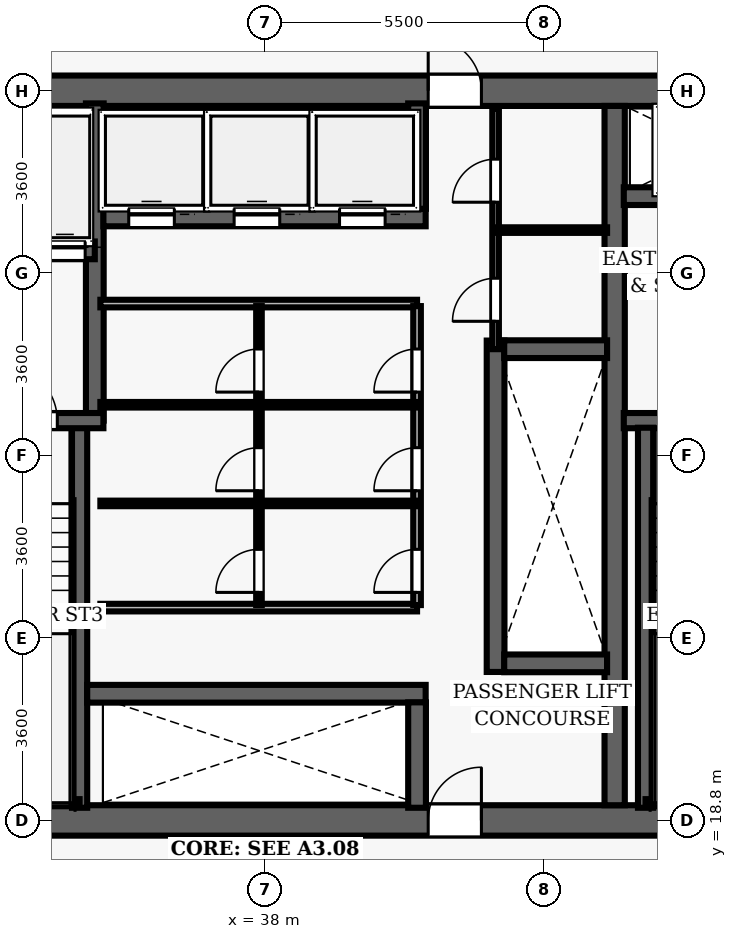
"""IFC4 building model, lengths in metres.
Left out: names, types, materials, properties, quantities, classifications, styles, units other than length and angle.
Written with IfcOpenShell. Run it as: python <this file> out.ifc"""

import sys

from ifc_helpers import new_model, si_unit, direction, frame, frame_2d, origin, place, context, subcontext, project, spatial, rectangle, extrude, element, fill, save


model = new_model("IFC4")
c1 = context("Model", 3, precision=1e-05, world=origin(), true_north=direction((0.0, 1.0)))
c2 = subcontext(c1, "Body", "Model", "MODEL_VIEW")
j1 = project(units=[si_unit("LENGTHUNIT", "METRE"), si_unit("PLANEANGLEUNIT", "RADIAN")], contexts=[c1])
p1 = place(None, origin())
s1 = spatial("IfcSite", under=j1, at=p1, CompositionType="ELEMENT")
p2 = place(p1, origin())
s2 = spatial("IfcBuilding", under=s1, at=p2, CompositionType="ELEMENT")
p3 = place(p2, frame((0.0, 0.0, 69.4)))
s3 = spatial("IfcBuildingStorey", under=s2, at=p3, CompositionType="ELEMENT", Elevation=69.4)
p4 = place(p3, frame((26.7, 18.8, 0.0), z_axis=(0.0, 0.0, 1.0), x_axis=(1.0, 0.0, 0.0)))
e1 = element("IfcWall", 1, at=p4, inside=s3, PredefinedType="SHEAR", context=c2, shape_type="SweptSolid", body=[
    extrude(rectangle(XDim=22.6, YDim=0.6, at=frame_2d((11.3, 0.0))), origin(), (0.0, 0.0, 1.0), 3.5),
])
p5 = place(p4, frame((14.52, 0.0, 0.0)))
e2 = element("IfcOpeningElement", 2, at=p5, cuts=e1, PredefinedType="OPENING", context=c2, shape_type="SweptSolid", body=[
    extrude(rectangle(XDim=1.05, YDim=2.15, at=frame_2d((0.525, 1.075))), frame((0.0, 0.31, 0.0), z_axis=(0.0, -1.0, 0.0), x_axis=(1.0, 0.0, 0.0)), (0.0, 0.0, 1.0), 0.62),
])
p6 = place(p3, frame((26.7, 33.2, 0.0), z_axis=(0.0, 0.0, 1.0), x_axis=(1.0, 0.0, 0.0)))
e3 = element("IfcWall", 3, at=p6, inside=s3, PredefinedType="SHEAR", context=c2, shape_type="SweptSolid", body=[
    extrude(rectangle(XDim=22.6, YDim=0.6, at=frame_2d((11.3, 0.0))), origin(), (0.0, 0.0, 1.0), 3.5),
])
p7 = place(p6, frame((4.62, 0.0, 0.0)))
e4 = element("IfcOpeningElement", 4, at=p7, cuts=e3, PredefinedType="OPENING", context=c2, shape_type="SweptSolid", body=[
    extrude(rectangle(XDim=1.05, YDim=2.15, at=frame_2d((0.525, 1.075))), frame((0.0, 0.31, 0.0), z_axis=(0.0, -1.0, 0.0), x_axis=(1.0, 0.0, 0.0)), (0.0, 0.0, 1.0), 0.62),
])
p8 = place(p6, frame((14.52, 0.0, 0.0)))
e5 = element("IfcOpeningElement", 5, at=p8, cuts=e3, PredefinedType="OPENING", context=c2, shape_type="SweptSolid", body=[
    extrude(rectangle(XDim=1.05, YDim=2.15, at=frame_2d((0.525, 1.075))), frame((0.0, 0.31, 0.0), z_axis=(0.0, -1.0, 0.0), x_axis=(1.0, 0.0, 0.0)), (0.0, 0.0, 1.0), 0.62),
])
p9 = place(p3, frame((44.9, 19.1, 0.0), z_axis=(0.0, 0.0, 1.0), x_axis=(0.0, 1.0, 0.0)))
e6 = element("IfcWall", 6, at=p9, inside=s3, PredefinedType="SHEAR", context=c2, shape_type="SweptSolid", body=[
    extrude(rectangle(XDim=13.8, YDim=0.4, at=frame_2d((6.9, 0.0))), origin(), (0.0, 0.0, 1.0), 3.5),
])
p10 = place(p3, frame((45.08, 26.69, 0.0), z_axis=(0.0, 0.0, 1.0), x_axis=(1.0, 0.0, 0.0)))
e7 = element("IfcWall", 7, at=p10, inside=s3, PredefinedType="SHEAR", context=c2, shape_type="SweptSolid", body=[
    extrude(rectangle(XDim=3.67, YDim=0.3, at=frame_2d((1.835, 0.0))), origin(), (0.0, 0.0, 1.0), 3.5),
])
p11 = place(p10, frame((1.05, 0.0, 0.0)))
e8 = element("IfcOpeningElement", 8, at=p11, cuts=e7, PredefinedType="OPENING", context=c2, shape_type="SweptSolid", body=[
    extrude(rectangle(XDim=1.1, YDim=2.15, at=frame_2d((0.55, 1.075))), frame((0.0, 0.16, 0.0), z_axis=(0.0, -1.0, 0.0), x_axis=(1.0, 0.0, 0.0)), (0.0, 0.0, 1.0), 0.32),
])
p12 = place(p3, frame((45.51, 19.05, 0.0), z_axis=(0.0, 0.0, 1.0), x_axis=(0.0, 1.0, 0.0)))
e9 = element("IfcWall", 9, at=p12, inside=s3, PredefinedType="SHEAR", context=c2, shape_type="SweptSolid", body=[
    extrude(rectangle(XDim=7.5, YDim=0.3, at=frame_2d((3.75, 0.0))), origin(), (0.0, 0.0, 1.0), 3.5),
])
p13 = place(p3, frame((45.51, 19.16, 0.0), z_axis=(0.0, 0.0, 1.0), x_axis=(1.0, 0.0, 0.0)))
e10 = element("IfcWall", 10, at=p13, inside=s3, PredefinedType="SHEAR", context=c2, shape_type="SweptSolid", body=[
    extrude(rectangle(XDim=3.095, YDim=0.12, at=frame_2d((1.547, 0.0))), origin(), (0.0, 0.0, 1.0), 3.5),
])
p14 = place(p3, frame((45.08, 31.12, 0.0), z_axis=(0.0, 0.0, 1.0), x_axis=(1.0, 0.0, 0.0)))
e11 = element("IfcWall", 11, at=p14, inside=s3, PredefinedType="SHEAR", context=c2, shape_type="SweptSolid", body=[
    extrude(rectangle(XDim=3.67, YDim=0.35, at=frame_2d((1.835, 0.0))), origin(), (0.0, 0.0, 1.0), 2.6),
])
p15 = place(p14, frame((1.25, 0.0, 0.0)))
e12 = element("IfcOpeningElement", 12, at=p15, cuts=e11, PredefinedType="OPENING", context=c2, shape_type="SweptSolid", body=[
    extrude(rectangle(XDim=1.1, YDim=2.15, at=frame_2d((0.55, 1.075))), frame((0.0, 0.185, 0.0), z_axis=(0.0, -1.0, 0.0), x_axis=(1.0, 0.0, 0.0)), (0.0, 0.0, 1.0), 0.37),
])
p16 = place(p3, frame((34.34, 19.05, 0.0), z_axis=(0.0, 0.0, 1.0), x_axis=(0.0, 1.0, 0.0)))
e13 = element("IfcWall", 13, at=p16, inside=s3, PredefinedType="SHEAR", context=c2, shape_type="SweptSolid", body=[
    extrude(rectangle(XDim=7.5, YDim=0.3, at=frame_2d((3.75, 0.0))), origin(), (0.0, 0.0, 1.0), 3.5),
])
p17 = place(p3, frame((34.64, 26.69, 0.0), z_axis=(0.0, 0.0, 1.0), x_axis=(0.0, 1.0, 0.0)))
e14 = element("IfcWall", 14, at=p17, inside=s3, PredefinedType="SHEAR", context=c2, shape_type="SweptSolid", body=[
    extrude(rectangle(XDim=6.26, YDim=0.35, at=frame_2d((3.13, 0.0))), origin(), (0.0, 0.0, 1.0), 3.5),
])
p18 = place(p3, frame((31.25, 26.69, 0.0), z_axis=(0.0, 0.0, 1.0), x_axis=(1.0, 0.0, 0.0)))
e15 = element("IfcWall", 15, at=p18, inside=s3, PredefinedType="SHEAR", context=c2, shape_type="SweptSolid", body=[
    extrude(rectangle(XDim=3.56, YDim=0.3, at=frame_2d((1.78, 0.0))), origin(), (0.0, 0.0, 1.0), 3.5),
])
p19 = place(p18, frame((1.55, 0.0, 0.0)))
e16 = element("IfcOpeningElement", 16, at=p19, cuts=e15, PredefinedType="OPENING", context=c2, shape_type="SweptSolid", body=[
    extrude(rectangle(XDim=1.1, YDim=2.15, at=frame_2d((0.55, 1.075))), frame((0.0, 0.16, 0.0), z_axis=(0.0, -1.0, 0.0), x_axis=(1.0, 0.0, 0.0)), (0.0, 0.0, 1.0), 0.32),
])
p20 = place(p3, frame((31.3, 19.16, 0.0), z_axis=(0.0, 0.0, 1.0), x_axis=(1.0, 0.0, 0.0)))
e17 = element("IfcWall", 17, at=p20, inside=s3, PredefinedType="SHEAR", context=c2, shape_type="SweptSolid", body=[
    extrude(rectangle(XDim=3.04, YDim=0.12, at=frame_2d((1.52, 0.0))), origin(), (0.0, 0.0, 1.0), 3.5),
])
p21 = place(p3, frame((32.23, 30.05, 0.0), z_axis=(0.0, 0.0, 1.0), x_axis=(1.0, 0.0, 0.0)))
e18 = element("IfcWall", 18, at=p21, inside=s3, PredefinedType="SHEAR", context=c2, shape_type="SweptSolid", body=[
    extrude(rectangle(XDim=2.41, YDim=0.35, at=frame_2d((1.205, 0.0))), origin(), (0.0, 0.0, 1.0), 2.6),
])
p22 = place(p21, frame((0.42, 0.0, 0.0)))
e19 = element("IfcOpeningElement", 19, at=p22, cuts=e18, PredefinedType="OPENING", context=c2, shape_type="SweptSolid", body=[
    extrude(rectangle(XDim=0.8, YDim=2.15, at=frame_2d((0.4, 1.075))), frame((0.0, 0.185, 0.0), z_axis=(0.0, -1.0, 0.0), x_axis=(1.0, 0.0, 0.0)), (0.0, 0.0, 1.0), 0.37),
])
p23 = place(p21, frame((1.42, 0.0, 0.0)))
e20 = element("IfcOpeningElement", 20, at=p23, cuts=e18, PredefinedType="OPENING", context=c2, shape_type="SweptSolid", body=[
    extrude(rectangle(XDim=0.8, YDim=2.15, at=frame_2d((0.4, 1.075))), frame((0.0, 0.185, 0.0), z_axis=(0.0, -1.0, 0.0), x_axis=(1.0, 0.0, 0.0)), (0.0, 0.0, 1.0), 0.37),
])
p24 = place(p3, frame((42.55, 21.73, 0.0), z_axis=(0.0, 0.0, 1.0), x_axis=(0.0, 1.0, 0.0)))
e21 = element("IfcWall", 21, at=p24, inside=s3, PredefinedType="SHEAR", context=c2, shape_type="SweptSolid", body=[
    extrude(rectangle(XDim=6.54, YDim=0.35, at=frame_2d((3.27, 0.0))), origin(), (0.0, 0.0, 1.0), 2.6),
])
for number, where, z_axis, x_axis in (
    (22, (42.72, 21.9, 0.0), (0.0, 0.0, 1.0), (1.0, 0.0, 0.0)),
    (23, (42.72, 28.1, 0.0), (0.0, 0.0, 1.0), (1.0, 0.0, 0.0)),
):
    element("IfcWall", number, at=place(p3, frame(where, z_axis=z_axis, x_axis=x_axis)), inside=s3, PredefinedType="SHEAR", context=c2, shape_type="SweptSolid", body=[
        extrude(rectangle(XDim=2.03, YDim=0.35, at=frame_2d((1.015, 0.0))), origin(), (0.0, 0.0, 1.0), 2.6),
    ])
p25 = place(p3, frame((34.81, 30.7, 0.0), z_axis=(0.0, 0.0, 1.0), x_axis=(1.0, 0.0, 0.0)))
e24 = element("IfcWall", 24, at=p25, inside=s3, PredefinedType="SHEAR", context=c2, shape_type="SweptSolid", body=[
    extrude(rectangle(XDim=6.36, YDim=0.35, at=frame_2d((3.18, 0.0))), origin(), (0.0, 0.0, 1.0), 2.6),
])
p26 = place(p25, frame((0.5, 0.0, 0.0)))
e25 = element("IfcOpeningElement", 25, at=p26, cuts=e24, PredefinedType="OPENING", context=c2, shape_type="SweptSolid", body=[
    extrude(rectangle(XDim=0.9, YDim=2.15, at=frame_2d((0.45, 1.075))), frame((0.0, 0.185, 0.0), z_axis=(0.0, -1.0, 0.0), x_axis=(1.0, 0.0, 0.0)), (0.0, 0.0, 1.0), 0.37),
])
p27 = place(p25, frame((2.58, 0.0, 0.0)))
e26 = element("IfcOpeningElement", 26, at=p27, cuts=e24, PredefinedType="OPENING", context=c2, shape_type="SweptSolid", body=[
    extrude(rectangle(XDim=0.9, YDim=2.15, at=frame_2d((0.45, 1.075))), frame((0.0, 0.185, 0.0), z_axis=(0.0, -1.0, 0.0), x_axis=(1.0, 0.0, 0.0)), (0.0, 0.0, 1.0), 0.37),
])
p28 = place(p25, frame((4.66, 0.0, 0.0)))
e27 = element("IfcOpeningElement", 27, at=p28, cuts=e24, PredefinedType="OPENING", context=c2, shape_type="SweptSolid", body=[
    extrude(rectangle(XDim=0.9, YDim=2.15, at=frame_2d((0.45, 1.075))), frame((0.0, 0.185, 0.0), z_axis=(0.0, -1.0, 0.0), x_axis=(1.0, 0.0, 0.0)), (0.0, 0.0, 1.0), 0.37),
])
p29 = place(p3, frame((41.0, 30.87, 0.0), z_axis=(0.0, 0.0, 1.0), x_axis=(0.0, 1.0, 0.0)))
e28 = element("IfcWall", 28, at=p29, inside=s3, PredefinedType="SHEAR", context=c2, shape_type="SweptSolid", body=[
    extrude(rectangle(XDim=2.08, YDim=0.35, at=frame_2d((1.04, 0.0))), origin(), (0.0, 0.0, 1.0), 2.6),
])
p30 = place(p3, frame((34.49, 21.3, 0.0), z_axis=(0.0, 0.0, 1.0), x_axis=(1.0, 0.0, 0.0)))
e29 = element("IfcWall", 29, at=p30, inside=s3, PredefinedType="SHEAR", context=c2, shape_type="SweptSolid", body=[
    extrude(rectangle(XDim=6.68, YDim=0.35, at=frame_2d((3.34, 0.0))), origin(), (0.0, 0.0, 1.0), 2.6),
])
p31 = place(p3, frame((41.0, 19.05, 0.0), z_axis=(0.0, 0.0, 1.0), x_axis=(0.0, 1.0, 0.0)))
e30 = element("IfcWall", 30, at=p31, inside=s3, PredefinedType="SHEAR", context=c2, shape_type="SweptSolid", body=[
    extrude(rectangle(XDim=2.08, YDim=0.35, at=frame_2d((1.04, 0.0))), origin(), (0.0, 0.0, 1.0), 2.6),
])
for number, where, z_axis, x_axis in (
    (31, (34.75, 29.0, 0.0), (0.0, 0.0, 1.0), (1.0, 0.0, 0.0)),
    (32, (34.75, 23.0, 0.0), (0.0, 0.0, 1.0), (1.0, 0.0, 0.0)),
):
    element("IfcWall", number, at=place(p3, frame(where, z_axis=z_axis, x_axis=x_axis)), inside=s3, PredefinedType="PARTITIONING", context=c2, shape_type="SweptSolid", body=[
        extrude(rectangle(XDim=6.25, YDim=0.15, at=frame_2d((3.125, 0.0))), origin(), (0.0, 0.0, 1.0), 2.6),
    ])
p32 = place(p3, frame((41.0, 23.05, 0.0), z_axis=(0.0, 0.0, 1.0), x_axis=(0.0, 1.0, 0.0)))
e33 = element("IfcWall", 33, at=p32, inside=s3, PredefinedType="PARTITIONING", context=c2, shape_type="SweptSolid", body=[
    extrude(rectangle(XDim=5.9, YDim=0.15, at=frame_2d((2.95, 0.0))), origin(), (0.0, 0.0, 1.0), 2.6),
])
p33 = place(p32, frame((0.25, 0.0, 0.0)))
e34 = element("IfcOpeningElement", 34, at=p33, cuts=e33, PredefinedType="OPENING", context=c2, shape_type="SweptSolid", body=[
    extrude(rectangle(XDim=0.85, YDim=2.1, at=frame_2d((0.425, 1.05))), frame((0.0, 0.085, 0.0), z_axis=(0.0, -1.0, 0.0), x_axis=(1.0, 0.0, 0.0)), (0.0, 0.0, 1.0), 0.17),
])
p34 = place(p32, frame((2.256, 0.0, 0.0)))
e35 = element("IfcOpeningElement", 35, at=p34, cuts=e33, PredefinedType="OPENING", context=c2, shape_type="SweptSolid", body=[
    extrude(rectangle(XDim=0.85, YDim=2.1, at=frame_2d((0.425, 1.05))), frame((0.0, 0.085, 0.0), z_axis=(0.0, -1.0, 0.0), x_axis=(1.0, 0.0, 0.0)), (0.0, 0.0, 1.0), 0.17),
])
p35 = place(p32, frame((4.203, 0.0, 0.0)))
e36 = element("IfcOpeningElement", 36, at=p35, cuts=e33, PredefinedType="OPENING", context=c2, shape_type="SweptSolid", body=[
    extrude(rectangle(XDim=0.85, YDim=2.1, at=frame_2d((0.425, 1.05))), frame((0.0, 0.085, 0.0), z_axis=(0.0, -1.0, 0.0), x_axis=(1.0, 0.0, 0.0)), (0.0, 0.0, 1.0), 0.17),
])
p36 = place(p3, frame((37.88, 23.05, 0.0), z_axis=(0.0, 0.0, 1.0), x_axis=(0.0, 1.0, 0.0)))
e37 = element("IfcWall", 37, at=p36, inside=s3, PredefinedType="PARTITIONING", context=c2, shape_type="SweptSolid", body=[
    extrude(rectangle(XDim=5.9, YDim=0.11, at=frame_2d((2.95, 0.0))), origin(), (0.0, 0.0, 1.0), 2.6),
])
p37 = place(p36, frame((0.25, 0.0, 0.0)))
e38 = element("IfcOpeningElement", 38, at=p37, cuts=e37, PredefinedType="OPENING", context=c2, shape_type="SweptSolid", body=[
    extrude(rectangle(XDim=0.85, YDim=2.1, at=frame_2d((0.425, 1.05))), frame((0.0, 0.065, 0.0), z_axis=(0.0, -1.0, 0.0), x_axis=(1.0, 0.0, 0.0)), (0.0, 0.0, 1.0), 0.13),
])
p38 = place(p36, frame((2.256, 0.0, 0.0)))
e39 = element("IfcOpeningElement", 39, at=p38, cuts=e37, PredefinedType="OPENING", context=c2, shape_type="SweptSolid", body=[
    extrude(rectangle(XDim=0.85, YDim=2.1, at=frame_2d((0.425, 1.05))), frame((0.0, 0.065, 0.0), z_axis=(0.0, -1.0, 0.0), x_axis=(1.0, 0.0, 0.0)), (0.0, 0.0, 1.0), 0.13),
])
p39 = place(p36, frame((4.203, 0.0, 0.0)))
e40 = element("IfcOpeningElement", 40, at=p39, cuts=e37, PredefinedType="OPENING", context=c2, shape_type="SweptSolid", body=[
    extrude(rectangle(XDim=0.85, YDim=2.1, at=frame_2d((0.425, 1.05))), frame((0.0, 0.065, 0.0), z_axis=(0.0, -1.0, 0.0), x_axis=(1.0, 0.0, 0.0)), (0.0, 0.0, 1.0), 0.13),
])
for number, where, z_axis, x_axis in (
    (41, (34.75, 25.056, 0.0), (0.0, 0.0, 1.0), (1.0, 0.0, 0.0)),
    (42, (34.75, 27.003, 0.0), (0.0, 0.0, 1.0), (1.0, 0.0, 0.0)),
):
    element("IfcWall", number, at=place(p3, frame(where, z_axis=z_axis, x_axis=x_axis)), inside=s3, PredefinedType="PARTITIONING", context=c2, shape_type="SweptSolid", body=[
        extrude(rectangle(XDim=6.25, YDim=0.11, at=frame_2d((3.125, 0.0))), origin(), (0.0, 0.0, 1.0), 2.6),
    ])
p40 = place(p3, frame((42.55, 28.1, 0.0), z_axis=(0.0, 0.0, 1.0), x_axis=(0.0, 1.0, 0.0)))
e43 = element("IfcWall", 43, at=p40, inside=s3, PredefinedType="PARTITIONING", context=c2, shape_type="SweptSolid", body=[
    extrude(rectangle(XDim=4.75, YDim=0.13, at=frame_2d((2.375, 0.0))), origin(), (0.0, 0.0, 1.0), 2.6),
])
p41 = place(p40, frame((0.55, 0.0, 0.0)))
e44 = element("IfcOpeningElement", 44, at=p41, cuts=e43, PredefinedType="OPENING", context=c2, shape_type="SweptSolid", body=[
    extrude(rectangle(XDim=0.85, YDim=2.1, at=frame_2d((0.425, 1.05))), frame((0.0, 0.075, 0.0), z_axis=(0.0, -1.0, 0.0), x_axis=(1.0, 0.0, 0.0)), (0.0, 0.0, 1.0), 0.15),
])
p42 = place(p40, frame((2.9, 0.0, 0.0)))
e45 = element("IfcOpeningElement", 45, at=p42, cuts=e43, PredefinedType="OPENING", context=c2, shape_type="SweptSolid", body=[
    extrude(rectangle(XDim=0.85, YDim=2.1, at=frame_2d((0.425, 1.05))), frame((0.0, 0.075, 0.0), z_axis=(0.0, -1.0, 0.0), x_axis=(1.0, 0.0, 0.0)), (0.0, 0.0, 1.0), 0.15),
])
p43 = place(p3, frame((42.55, 30.45, 0.0), z_axis=(0.0, 0.0, 1.0), x_axis=(1.0, 0.0, 0.0)))
e46 = element("IfcWall", 46, at=p43, inside=s3, PredefinedType="PARTITIONING", context=c2, shape_type="SweptSolid", body=[
    extrude(rectangle(XDim=2.2, YDim=0.11, at=frame_2d((1.1, 0.0))), origin(), (0.0, 0.0, 1.0), 2.6),
])
p44 = place(p19, origin())
e47 = element("IfcDoor", 47, at=p44, inside=s3, OperationType="SINGLE_SWING_LEFT", PredefinedType="DOOR", context=c2, shape_type="SweptSolid", body=[
    extrude(rectangle(XDim=1.1, YDim=2.15, at=frame_2d((0.55, 1.075))), frame((0.0, 0.025, 0.0), z_axis=(0.0, -1.0, 0.0), x_axis=(1.0, 0.0, 0.0)), (0.0, 0.0, 1.0), 0.05),
])
fill(e16, e47)
p45 = place(p8, origin())
e48 = element("IfcDoor", 48, at=p45, inside=s3, OperationType="SINGLE_SWING_LEFT", PredefinedType="DOOR", context=c2, shape_type="SweptSolid", body=[
    extrude(rectangle(XDim=1.05, YDim=2.15, at=frame_2d((0.525, 1.075))), frame((0.0, 0.025, 0.0), z_axis=(0.0, -1.0, 0.0), x_axis=(1.0, 0.0, 0.0)), (0.0, 0.0, 1.0), 0.05),
])
fill(e5, e48)
p46 = place(p5, origin())
e49 = element("IfcDoor", 49, at=p46, inside=s3, OperationType="SINGLE_SWING_RIGHT", PredefinedType="DOOR", context=c2, shape_type="SweptSolid", body=[
    extrude(rectangle(XDim=1.05, YDim=2.15, at=frame_2d((0.525, 1.075))), frame((0.0, 0.025, 0.0), z_axis=(0.0, -1.0, 0.0), x_axis=(1.0, 0.0, 0.0)), (0.0, 0.0, 1.0), 0.05),
])
fill(e2, e49)
p47 = place(p33, origin())
e50 = element("IfcDoor", 50, at=p47, inside=s3, OperationType="SINGLE_SWING_LEFT", PredefinedType="DOOR", context=c2, shape_type="SweptSolid", body=[
    extrude(rectangle(XDim=0.85, YDim=2.1, at=frame_2d((0.425, 1.05))), frame((0.0, 0.025, 0.0), z_axis=(0.0, -1.0, 0.0), x_axis=(1.0, 0.0, 0.0)), (0.0, 0.0, 1.0), 0.05),
])
fill(e34, e50)
p48 = place(p37, origin())
e51 = element("IfcDoor", 51, at=p48, inside=s3, OperationType="SINGLE_SWING_LEFT", PredefinedType="DOOR", context=c2, shape_type="SweptSolid", body=[
    extrude(rectangle(XDim=0.85, YDim=2.1, at=frame_2d((0.425, 1.05))), frame((0.0, 0.025, 0.0), z_axis=(0.0, -1.0, 0.0), x_axis=(1.0, 0.0, 0.0)), (0.0, 0.0, 1.0), 0.05),
])
fill(e38, e51)
p49 = place(p34, origin())
e52 = element("IfcDoor", 52, at=p49, inside=s3, OperationType="SINGLE_SWING_LEFT", PredefinedType="DOOR", context=c2, shape_type="SweptSolid", body=[
    extrude(rectangle(XDim=0.85, YDim=2.1, at=frame_2d((0.425, 1.05))), frame((0.0, 0.025, 0.0), z_axis=(0.0, -1.0, 0.0), x_axis=(1.0, 0.0, 0.0)), (0.0, 0.0, 1.0), 0.05),
])
fill(e35, e52)
p50 = place(p38, origin())
e53 = element("IfcDoor", 53, at=p50, inside=s3, OperationType="SINGLE_SWING_LEFT", PredefinedType="DOOR", context=c2, shape_type="SweptSolid", body=[
    extrude(rectangle(XDim=0.85, YDim=2.1, at=frame_2d((0.425, 1.05))), frame((0.0, 0.025, 0.0), z_axis=(0.0, -1.0, 0.0), x_axis=(1.0, 0.0, 0.0)), (0.0, 0.0, 1.0), 0.05),
])
fill(e39, e53)
p51 = place(p35, origin())
e54 = element("IfcDoor", 54, at=p51, inside=s3, OperationType="SINGLE_SWING_LEFT", PredefinedType="DOOR", context=c2, shape_type="SweptSolid", body=[
    extrude(rectangle(XDim=0.85, YDim=2.1, at=frame_2d((0.425, 1.05))), frame((0.0, 0.025, 0.0), z_axis=(0.0, -1.0, 0.0), x_axis=(1.0, 0.0, 0.0)), (0.0, 0.0, 1.0), 0.05),
])
fill(e36, e54)
p52 = place(p39, origin())
e55 = element("IfcDoor", 55, at=p52, inside=s3, OperationType="SINGLE_SWING_LEFT", PredefinedType="DOOR", context=c2, shape_type="SweptSolid", body=[
    extrude(rectangle(XDim=0.85, YDim=2.1, at=frame_2d((0.425, 1.05))), frame((0.0, 0.025, 0.0), z_axis=(0.0, -1.0, 0.0), x_axis=(1.0, 0.0, 0.0)), (0.0, 0.0, 1.0), 0.05),
])
fill(e40, e55)
p53 = place(p41, origin())
e56 = element("IfcDoor", 56, at=p53, inside=s3, OperationType="SINGLE_SWING_LEFT", PredefinedType="DOOR", context=c2, shape_type="SweptSolid", body=[
    extrude(rectangle(XDim=0.85, YDim=2.1, at=frame_2d((0.425, 1.05))), frame((0.0, 0.025, 0.0), z_axis=(0.0, -1.0, 0.0), x_axis=(1.0, 0.0, 0.0)), (0.0, 0.0, 1.0), 0.05),
])
fill(e44, e56)
p54 = place(p42, origin())
e57 = element("IfcDoor", 57, at=p54, inside=s3, OperationType="SINGLE_SWING_LEFT", PredefinedType="DOOR", context=c2, shape_type="SweptSolid", body=[
    extrude(rectangle(XDim=0.85, YDim=2.1, at=frame_2d((0.425, 1.05))), frame((0.0, 0.025, 0.0), z_axis=(0.0, -1.0, 0.0), x_axis=(1.0, 0.0, 0.0)), (0.0, 0.0, 1.0), 0.05),
])
fill(e45, e57)
p55 = place(p26, origin())
e58 = element("IfcDoor", 58, at=p55, inside=s3, OperationType="SLIDING_TO_LEFT", PredefinedType="DOOR", context=c2, shape_type="SweptSolid", body=[
    extrude(rectangle(XDim=0.9, YDim=2.15, at=frame_2d((0.45, 1.075))), frame((0.0, 0.025, 0.0), z_axis=(0.0, -1.0, 0.0), x_axis=(1.0, 0.0, 0.0)), (0.0, 0.0, 1.0), 0.05),
])
fill(e25, e58)
p56 = place(p27, origin())
e59 = element("IfcDoor", 59, at=p56, inside=s3, OperationType="SLIDING_TO_LEFT", PredefinedType="DOOR", context=c2, shape_type="SweptSolid", body=[
    extrude(rectangle(XDim=0.9, YDim=2.15, at=frame_2d((0.45, 1.075))), frame((0.0, 0.025, 0.0), z_axis=(0.0, -1.0, 0.0), x_axis=(1.0, 0.0, 0.0)), (0.0, 0.0, 1.0), 0.05),
])
fill(e26, e59)
p57 = place(p28, origin())
e60 = element("IfcDoor", 60, at=p57, inside=s3, OperationType="SLIDING_TO_LEFT", PredefinedType="DOOR", context=c2, shape_type="SweptSolid", body=[
    extrude(rectangle(XDim=0.9, YDim=2.15, at=frame_2d((0.45, 1.075))), frame((0.0, 0.025, 0.0), z_axis=(0.0, -1.0, 0.0), x_axis=(1.0, 0.0, 0.0)), (0.0, 0.0, 1.0), 0.05),
])
fill(e27, e60)
p58 = place(p23, origin())
e61 = element("IfcDoor", 61, at=p58, inside=s3, OperationType="SLIDING_TO_LEFT", PredefinedType="DOOR", context=c2, shape_type="SweptSolid", body=[
    extrude(rectangle(XDim=0.8, YDim=2.15, at=frame_2d((0.4, 1.075))), frame((0.0, 0.025, 0.0), z_axis=(0.0, -1.0, 0.0), x_axis=(1.0, 0.0, 0.0)), (0.0, 0.0, 1.0), 0.05),
])
fill(e20, e61)
save(model, sys.argv[1])
